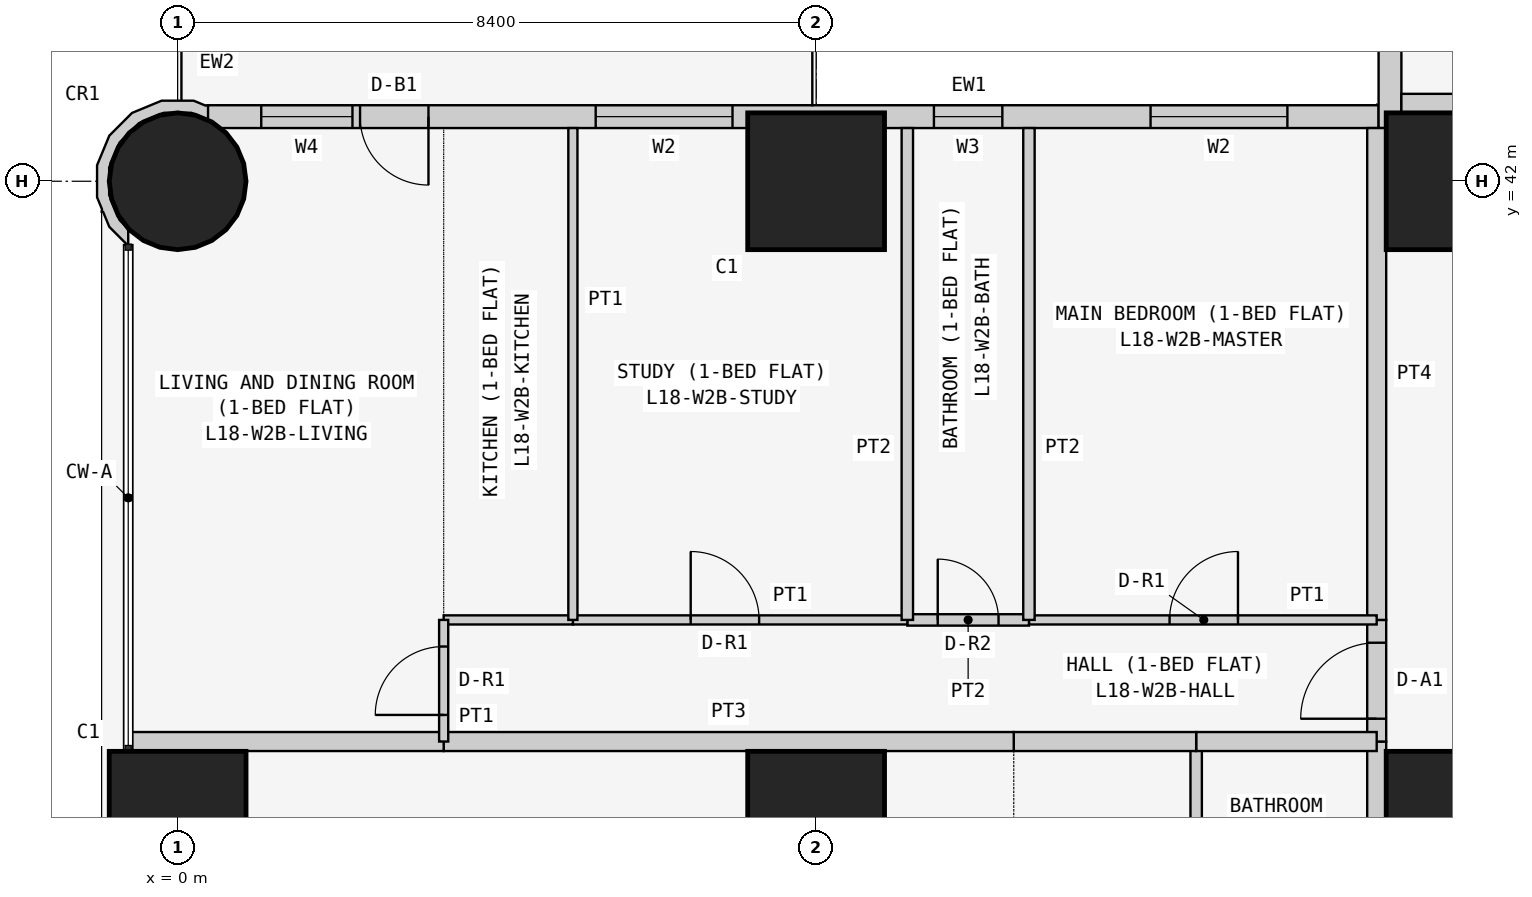
"""IFC4 building model, lengths in metres.
Left out: names, types, materials, properties, quantities, classifications, styles, units other than length and angle.
Written with IfcOpenShell. Run it as: python <this file> out.ifc"""

import sys

from ifc_helpers import new_model, si_unit, direction, frame, frame_2d, origin, origin_2d, place, context, subcontext, project, spatial, polyline, rectangle, circle, outline, extrude, element, fill, save


model = new_model("IFC4")
c1 = context("Model", 3, precision=1e-05, world=origin(), true_north=direction((0.0, 1.0)))
c2 = subcontext(c1, "Body", "Model", "MODEL_VIEW")
j1 = project(units=[si_unit("LENGTHUNIT", "METRE"), si_unit("PLANEANGLEUNIT", "RADIAN")], contexts=[c1])
p1 = place(None, origin())
s1 = spatial("IfcSite", under=j1, at=p1, CompositionType="ELEMENT")
p2 = place(p1, origin())
s2 = spatial("IfcBuilding", under=s1, at=p2, CompositionType="ELEMENT")
p3 = place(p2, frame((0.0, 0.0, 74.1)))
s3 = spatial("IfcBuildingStorey", under=s2, at=p3, CompositionType="ELEMENT", Elevation=74.1)
p4 = place(p3, frame((0.0, 33.6, 0.0), z_axis=(0.0, 0.0, 1.0), x_axis=(1.0, 0.0, 0.0)))
e1 = element("IfcColumn", 1, at=p4, inside=s3, PredefinedType="COLUMN", context=c2, shape_type="SweptSolid", body=[
    extrude(rectangle(XDim=1.8, YDim=1.8, at=origin_2d()), origin(), (0.0, 0.0, 1.0), 3.6),
])
p5 = place(p3, frame((0.0, 42.0, 0.0), z_axis=(0.0, 0.0, 1.0), x_axis=(1.0, 0.0, 0.0)))
e2 = element("IfcColumn", 2, at=p5, inside=s3, PredefinedType="COLUMN", context=c2, shape_type="SweptSolid", body=[
    extrude(circle(Radius=0.9, at=origin_2d()), origin(), (0.0, 0.0, 1.0), 3.6),
])
for number, where, z_axis, x_axis in (
    (3, (8.4, 33.6, 0.0), (0.0, 0.0, 1.0), (1.0, 0.0, 0.0)),
    (4, (8.4, 42.0, 0.0), (0.0, 0.0, 1.0), (1.0, 0.0, 0.0)),
    (5, (16.8, 33.6, 0.0), (0.0, 0.0, 1.0), (1.0, 0.0, 0.0)),
    (6, (16.8, 42.0, 0.0), (0.0, 0.0, 1.0), (1.0, 0.0, 0.0)),
):
    element("IfcColumn", number, at=place(p3, frame(where, z_axis=z_axis, x_axis=x_axis)), inside=s3, PredefinedType="COLUMN", context=c2, shape_type="SweptSolid", body=[
        extrude(rectangle(XDim=1.8, YDim=1.8, at=origin_2d()), origin(), (0.0, 0.0, 1.0), 3.6),
    ])
p6 = place(p3, frame((15.8, 42.85, 0.0), z_axis=(0.0, 0.0, 1.0), x_axis=(-1.0, 0.0, 0.0)))
e7 = element("IfcWall", 7, at=p6, inside=s3, PredefinedType="SOLIDWALL", context=c2, shape_type="SweptSolid", body=[
    extrude(rectangle(XDim=15.4, YDim=0.3, at=frame_2d((7.7, 0.0))), origin(), (0.0, 0.0, 1.0), 3.45),
])
p7 = place(p6, frame((1.2, 0.0, 0.9)))
e8 = element("IfcOpeningElement", 8, at=p7, cuts=e7, PredefinedType="OPENING", context=c2, shape_type="SweptSolid", body=[
    extrude(rectangle(XDim=1.8, YDim=1.5, at=frame_2d((0.9, 0.75))), frame((0.0, 0.16, 0.0), z_axis=(0.0, -1.0, 0.0), x_axis=(1.0, 0.0, 0.0)), (0.0, 0.0, 1.0), 0.32),
])
p8 = place(p6, frame((4.95, 0.0, 1.5)))
e9 = element("IfcOpeningElement", 9, at=p8, cuts=e7, PredefinedType="OPENING", context=c2, shape_type="SweptSolid", body=[
    extrude(rectangle(XDim=0.9, YDim=0.7, at=frame_2d((0.45, 0.35))), frame((0.0, 0.16, 0.0), z_axis=(0.0, -1.0, 0.0), x_axis=(1.0, 0.0, 0.0)), (0.0, 0.0, 1.0), 0.32),
])
p9 = place(p6, frame((8.5, 0.0, 0.9)))
e10 = element("IfcOpeningElement", 10, at=p9, cuts=e7, PredefinedType="OPENING", context=c2, shape_type="SweptSolid", body=[
    extrude(rectangle(XDim=1.8, YDim=1.5, at=frame_2d((0.9, 0.75))), frame((0.0, 0.16, 0.0), z_axis=(0.0, -1.0, 0.0), x_axis=(1.0, 0.0, 0.0)), (0.0, 0.0, 1.0), 0.32),
])
p10 = place(p6, frame((12.5, 0.0, 0.0)))
e11 = element("IfcOpeningElement", 11, at=p10, cuts=e7, PredefinedType="OPENING", context=c2, shape_type="SweptSolid", body=[
    extrude(rectangle(XDim=0.9, YDim=2.4, at=frame_2d((0.45, 1.2))), frame((0.0, 0.16, 0.0), z_axis=(0.0, -1.0, 0.0), x_axis=(1.0, 0.0, 0.0)), (0.0, 0.0, 1.0), 0.32),
])
p11 = place(p6, frame((13.5, 0.0, 0.9)))
e12 = element("IfcOpeningElement", 12, at=p11, cuts=e7, PredefinedType="OPENING", context=c2, shape_type="SweptSolid", body=[
    extrude(rectangle(XDim=1.2, YDim=1.5, at=frame_2d((0.6, 0.75))), frame((0.0, 0.16, 0.0), z_axis=(0.0, -1.0, 0.0), x_axis=(1.0, 0.0, 0.0)), (0.0, 0.0, 1.0), 0.32),
])
p12 = place(p3, frame((15.95, 58.4, 0.0), z_axis=(0.0, 0.0, 1.0), x_axis=(0.0, -1.0, 0.0)))
e13 = element("IfcWall", 13, at=p12, inside=s3, PredefinedType="SOLIDWALL", context=c2, shape_type="SweptSolid", body=[
    extrude(rectangle(XDim=15.7, YDim=0.3, at=frame_2d((7.85, 0.0))), origin(), (0.0, 0.0, 1.0), 3.45),
])
p13 = place(p12, frame((12.4, 0.0, 0.9)))
e14 = element("IfcOpeningElement", 14, at=p13, cuts=e13, PredefinedType="OPENING", context=c2, shape_type="SweptSolid", body=[
    extrude(rectangle(XDim=1.8, YDim=1.5, at=frame_2d((0.9, 0.75))), frame((0.0, 0.16, 0.0), z_axis=(0.0, -1.0, 0.0), x_axis=(1.0, 0.0, 0.0)), (0.0, 0.0, 1.0), 0.32),
])
p14 = place(p12, frame((9.55, 0.0, 1.5)))
e15 = element("IfcOpeningElement", 15, at=p14, cuts=e13, PredefinedType="OPENING", context=c2, shape_type="SweptSolid", body=[
    extrude(rectangle(XDim=0.9, YDim=0.7, at=frame_2d((0.45, 0.35))), frame((0.0, 0.16, 0.0), z_axis=(0.0, -1.0, 0.0), x_axis=(1.0, 0.0, 0.0)), (0.0, 0.0, 1.0), 0.32),
])
p15 = place(p12, frame((5.1, 0.0, 0.9)))
e16 = element("IfcOpeningElement", 16, at=p15, cuts=e13, PredefinedType="OPENING", context=c2, shape_type="SweptSolid", body=[
    extrude(rectangle(XDim=1.8, YDim=1.5, at=frame_2d((0.9, 0.75))), frame((0.0, 0.16, 0.0), z_axis=(0.0, -1.0, 0.0), x_axis=(1.0, 0.0, 0.0)), (0.0, 0.0, 1.0), 0.32),
])
p16 = place(p12, frame((2.0, 0.0, 0.0)))
e17 = element("IfcOpeningElement", 17, at=p16, cuts=e13, PredefinedType="OPENING", context=c2, shape_type="SweptSolid", body=[
    extrude(rectangle(XDim=0.9, YDim=2.4, at=frame_2d((0.45, 1.2))), frame((0.0, 0.16, 0.0), z_axis=(0.0, -1.0, 0.0), x_axis=(1.0, 0.0, 0.0)), (0.0, 0.0, 1.0), 0.32),
])
p17 = place(p12, frame((0.7, 0.0, 0.9)))
e18 = element("IfcOpeningElement", 18, at=p17, cuts=e13, PredefinedType="OPENING", context=c2, shape_type="SweptSolid", body=[
    extrude(rectangle(XDim=1.2, YDim=1.5, at=frame_2d((0.6, 0.75))), frame((0.0, 0.16, 0.0), z_axis=(0.0, -1.0, 0.0), x_axis=(1.0, 0.0, 0.0)), (0.0, 0.0, 1.0), 0.32),
])
p18 = place(p3, frame((0.364, 42.91, 0.0), z_axis=(0.0, 0.0, 1.0), x_axis=(-0.926129809145, 0.377204953059, 0.0)))
e19 = element("IfcWall", 19, at=p18, inside=s3, PredefinedType="SOLIDWALL", context=c2, shape_type="SweptSolid", body=[
    extrude(outline(polyline([(0.36, 1.803), (0.509, 1.741), (0.761, 1.486), (0.896, 1.154), (0.894, 0.795), (0.755, 0.465), (0.5, 0.213), (0.168, 0.078), (-0.1, 0.08), (0.001, -0.097), (0.03, -0.08), (0.199, -0.081), (0.589, 0.078), (0.889, 0.374), (1.053, 0.763), (1.055, 1.185), (0.896, 1.575), (0.778, 1.695), (0.769, 1.728), (0.75, 1.723), (0.6, 1.875), (0.295, 2.003), (0.281, 1.998), (0.36, 1.803)])), origin(), (0.0, 0.0, 1.0), 3.45),
])
p19 = place(p3, frame((16.1, 43.025, 0.0), z_axis=(0.0, 0.0, 1.0), x_axis=(1.0, 0.0, 0.0)))
e20 = element("IfcWall", 20, at=p19, inside=s3, PredefinedType="PARTITIONING", context=c2, shape_type="SweptSolid", body=[
    extrude(rectangle(XDim=6.871, YDim=0.25, at=frame_2d((3.436, 0.0))), origin(), (0.0, 0.0, 1.0), 3.45),
])
p20 = place(p3, frame((15.775, 32.0, 0.0), z_axis=(0.0, 0.0, 1.0), x_axis=(0.0, 1.0, 0.0)))
e21 = element("IfcWall", 21, at=p20, inside=s3, PredefinedType="PARTITIONING", context=c2, shape_type="SweptSolid", body=[
    extrude(rectangle(XDim=2.629, YDim=0.25, at=frame_2d((1.314, 0.0))), origin(), (0.0, 0.0, 1.0), 3.45),
])
p21 = place(p3, frame((15.775, 34.629, 0.0), z_axis=(0.0, 0.0, 1.0), x_axis=(0.0, 1.0, 0.0)))
e22 = element("IfcWall", 22, at=p21, inside=s3, PredefinedType="PARTITIONING", context=c2, shape_type="SweptSolid", body=[
    extrude(rectangle(XDim=1.6, YDim=0.25, at=frame_2d((0.8, 0.0))), origin(), (0.0, 0.0, 1.0), 3.45),
])
p22 = place(p21, frame((0.3, 0.0, 0.0)))
e23 = element("IfcOpeningElement", 23, at=p22, cuts=e22, PredefinedType="OPENING", context=c2, shape_type="SweptSolid", body=[
    extrude(rectangle(XDim=1.0, YDim=2.1, at=frame_2d((0.5, 1.05))), frame((0.0, 0.135, 0.0), z_axis=(0.0, -1.0, 0.0), x_axis=(1.0, 0.0, 0.0)), (0.0, 0.0, 1.0), 0.27),
])
p23 = place(p3, frame((15.775, 36.229, 0.0), z_axis=(0.0, 0.0, 1.0), x_axis=(0.0, 1.0, 0.0)))
e24 = element("IfcWall", 24, at=p23, inside=s3, PredefinedType="PARTITIONING", context=c2, shape_type="SweptSolid", body=[
    extrude(rectangle(XDim=6.471, YDim=0.25, at=frame_2d((3.235, 0.0))), origin(), (0.0, 0.0, 1.0), 3.45),
])
p24 = place(p3, frame((13.4, 32.0, 0.0), z_axis=(0.0, 0.0, 1.0), x_axis=(0.0, 1.0, 0.0)))
e25 = element("IfcWall", 25, at=p24, inside=s3, PredefinedType="PARTITIONING", context=c2, shape_type="SweptSolid", body=[
    extrude(rectangle(XDim=2.629, YDim=0.15, at=frame_2d((1.314, 0.0))), origin(), (0.0, 0.0, 1.0), 3.45),
])
p25 = place(p3, frame((13.4, 34.629, 0.0), z_axis=(0.0, 0.0, 1.0), x_axis=(1.0, 0.0, 0.0)))
e26 = element("IfcWall", 26, at=p25, inside=s3, PredefinedType="PARTITIONING", context=c2, shape_type="SweptSolid", body=[
    extrude(rectangle(XDim=2.375, YDim=0.25, at=frame_2d((1.188, 0.0))), origin(), (0.0, 0.0, 1.0), 3.45),
])
p26 = place(p3, frame((11.0, 34.629, 0.0), z_axis=(0.0, 0.0, 1.0), x_axis=(1.0, 0.0, 0.0)))
e27 = element("IfcWall", 27, at=p26, inside=s3, PredefinedType="PARTITIONING", context=c2, shape_type="SweptSolid", body=[
    extrude(rectangle(XDim=2.4, YDim=0.25, at=frame_2d((1.2, 0.0))), origin(), (0.0, 0.0, 1.0), 3.45),
])
p27 = place(p3, frame((3.5, 34.629, 0.0), z_axis=(0.0, 0.0, 1.0), x_axis=(1.0, 0.0, 0.0)))
e28 = element("IfcWall", 28, at=p27, inside=s3, PredefinedType="PARTITIONING", context=c2, shape_type="SweptSolid", body=[
    extrude(rectangle(XDim=7.5, YDim=0.25, at=frame_2d((3.75, 0.0))), origin(), (0.0, 0.0, 1.0), 3.45),
])
p28 = place(p3, frame((-0.65, 34.629, 0.0), z_axis=(0.0, 0.0, 1.0), x_axis=(1.0, 0.0, 0.0)))
e29 = element("IfcWall", 29, at=p28, inside=s3, PredefinedType="PARTITIONING", context=c2, shape_type="SweptSolid", body=[
    extrude(rectangle(XDim=4.15, YDim=0.25, at=frame_2d((2.075, 0.0))), origin(), (0.0, 0.0, 1.0), 3.45),
])
p29 = place(p3, frame((11.2, 36.229, 0.0), z_axis=(0.0, 0.0, 1.0), x_axis=(1.0, 0.0, 0.0)))
e30 = element("IfcWall", 30, at=p29, inside=s3, PredefinedType="PARTITIONING", context=c2, shape_type="SweptSolid", body=[
    extrude(rectangle(XDim=4.575, YDim=0.12, at=frame_2d((2.288, 0.0))), origin(), (0.0, 0.0, 1.0), 3.45),
])
p30 = place(p29, frame((1.85, 0.0, 0.0)))
e31 = element("IfcOpeningElement", 31, at=p30, cuts=e30, PredefinedType="OPENING", context=c2, shape_type="SweptSolid", body=[
    extrude(rectangle(XDim=0.9, YDim=2.1, at=frame_2d((0.45, 1.05))), frame((0.0, 0.07, 0.0), z_axis=(0.0, -1.0, 0.0), x_axis=(1.0, 0.0, 0.0)), (0.0, 0.0, 1.0), 0.14),
])
p31 = place(p3, frame((9.6, 36.229, 0.0), z_axis=(0.0, 0.0, 1.0), x_axis=(1.0, 0.0, 0.0)))
e32 = element("IfcWall", 32, at=p31, inside=s3, PredefinedType="PARTITIONING", context=c2, shape_type="SweptSolid", body=[
    extrude(rectangle(XDim=1.6, YDim=0.15, at=frame_2d((0.8, 0.0))), origin(), (0.0, 0.0, 1.0), 3.45),
])
p32 = place(p31, frame((0.4, 0.0, 0.0)))
e33 = element("IfcOpeningElement", 33, at=p32, cuts=e32, PredefinedType="OPENING", context=c2, shape_type="SweptSolid", body=[
    extrude(rectangle(XDim=0.8, YDim=2.1, at=frame_2d((0.4, 1.05))), frame((0.0, 0.085, 0.0), z_axis=(0.0, -1.0, 0.0), x_axis=(1.0, 0.0, 0.0)), (0.0, 0.0, 1.0), 0.17),
])
p33 = place(p3, frame((5.2, 36.229, 0.0), z_axis=(0.0, 0.0, 1.0), x_axis=(1.0, 0.0, 0.0)))
e34 = element("IfcWall", 34, at=p33, inside=s3, PredefinedType="PARTITIONING", context=c2, shape_type="SweptSolid", body=[
    extrude(rectangle(XDim=4.4, YDim=0.12, at=frame_2d((2.2, 0.0))), origin(), (0.0, 0.0, 1.0), 3.45),
])
p34 = place(p33, frame((1.55, 0.0, 0.0)))
e35 = element("IfcOpeningElement", 35, at=p34, cuts=e34, PredefinedType="OPENING", context=c2, shape_type="SweptSolid", body=[
    extrude(rectangle(XDim=0.9, YDim=2.1, at=frame_2d((0.45, 1.05))), frame((0.0, 0.07, 0.0), z_axis=(0.0, -1.0, 0.0), x_axis=(1.0, 0.0, 0.0)), (0.0, 0.0, 1.0), 0.14),
])
p35 = place(p3, frame((3.5, 36.229, 0.0), z_axis=(0.0, 0.0, 1.0), x_axis=(1.0, 0.0, 0.0)))
e36 = element("IfcWall", 36, at=p35, inside=s3, PredefinedType="PARTITIONING", context=c2, shape_type="SweptSolid", body=[
    extrude(rectangle(XDim=1.7, YDim=0.12, at=frame_2d((0.85, 0.0))), origin(), (0.0, 0.0, 1.0), 3.45),
])
p36 = place(p3, frame((3.5, 34.629, 0.0), z_axis=(0.0, 0.0, 1.0), x_axis=(0.0, 1.0, 0.0)))
e37 = element("IfcWall", 37, at=p36, inside=s3, PredefinedType="PARTITIONING", context=c2, shape_type="SweptSolid", body=[
    extrude(rectangle(XDim=1.6, YDim=0.12, at=frame_2d((0.8, 0.0))), origin(), (0.0, 0.0, 1.0), 3.45),
])
p37 = place(p36, frame((0.35, 0.0, 0.0)))
e38 = element("IfcOpeningElement", 38, at=p37, cuts=e37, PredefinedType="OPENING", context=c2, shape_type="SweptSolid", body=[
    extrude(rectangle(XDim=0.9, YDim=2.1, at=frame_2d((0.45, 1.05))), frame((0.0, 0.07, 0.0), z_axis=(0.0, -1.0, 0.0), x_axis=(1.0, 0.0, 0.0)), (0.0, 0.0, 1.0), 0.14),
])
for number, where, z_axis, x_axis in (
    (39, (11.2, 36.229, 0.0), (0.0, 0.0, 1.0), (0.0, 1.0, 0.0)),
    (40, (9.6, 36.229, 0.0), (0.0, 0.0, 1.0), (0.0, 1.0, 0.0)),
):
    element("IfcWall", number, at=place(p3, frame(where, z_axis=z_axis, x_axis=x_axis)), inside=s3, PredefinedType="PARTITIONING", context=c2, shape_type="SweptSolid", body=[
        extrude(rectangle(XDim=6.471, YDim=0.15, at=frame_2d((3.235, 0.0))), origin(), (0.0, 0.0, 1.0), 3.45),
    ])
p38 = place(p3, frame((5.2, 36.229, 0.0), z_axis=(0.0, 0.0, 1.0), x_axis=(0.0, 1.0, 0.0)))
e41 = element("IfcWall", 41, at=p38, inside=s3, PredefinedType="PARTITIONING", context=c2, shape_type="SweptSolid", body=[
    extrude(rectangle(XDim=6.471, YDim=0.12, at=frame_2d((3.235, 0.0))), origin(), (0.0, 0.0, 1.0), 3.45),
])
p39 = place(p7, origin())
e42 = element("IfcWindow", 42, at=p39, inside=s3, PartitioningType="SINGLE_PANEL", PredefinedType="WINDOW", context=c2, shape_type="SweptSolid", body=[
    extrude(rectangle(XDim=1.8, YDim=1.5, at=frame_2d((0.9, 0.75))), frame((0.0, 0.03, 0.0), z_axis=(0.0, -1.0, 0.0), x_axis=(1.0, 0.0, 0.0)), (0.0, 0.0, 1.0), 0.06),
])
fill(e8, e42)
p40 = place(p8, origin())
e43 = element("IfcWindow", 43, at=p40, inside=s3, PartitioningType="SINGLE_PANEL", PredefinedType="WINDOW", context=c2, shape_type="SweptSolid", body=[
    extrude(rectangle(XDim=0.9, YDim=0.7, at=frame_2d((0.45, 0.35))), frame((0.0, 0.03, 0.0), z_axis=(0.0, -1.0, 0.0), x_axis=(1.0, 0.0, 0.0)), (0.0, 0.0, 1.0), 0.06),
])
fill(e9, e43)
p41 = place(p9, origin())
e44 = element("IfcWindow", 44, at=p41, inside=s3, PartitioningType="SINGLE_PANEL", PredefinedType="WINDOW", context=c2, shape_type="SweptSolid", body=[
    extrude(rectangle(XDim=1.8, YDim=1.5, at=frame_2d((0.9, 0.75))), frame((0.0, 0.03, 0.0), z_axis=(0.0, -1.0, 0.0), x_axis=(1.0, 0.0, 0.0)), (0.0, 0.0, 1.0), 0.06),
])
fill(e10, e44)
p42 = place(p10, origin())
e45 = element("IfcDoor", 45, at=p42, inside=s3, OperationType="SINGLE_SWING_LEFT", PredefinedType="DOOR", context=c2, shape_type="SweptSolid", body=[
    extrude(rectangle(XDim=0.9, YDim=2.4, at=frame_2d((0.45, 1.2))), frame((0.0, 0.025, 0.0), z_axis=(0.0, -1.0, 0.0), x_axis=(1.0, 0.0, 0.0)), (0.0, 0.0, 1.0), 0.05),
])
fill(e11, e45)
p43 = place(p11, origin())
e46 = element("IfcWindow", 46, at=p43, inside=s3, PartitioningType="SINGLE_PANEL", PredefinedType="WINDOW", context=c2, shape_type="SweptSolid", body=[
    extrude(rectangle(XDim=1.2, YDim=1.5, at=frame_2d((0.6, 0.75))), frame((0.0, 0.03, 0.0), z_axis=(0.0, -1.0, 0.0), x_axis=(1.0, 0.0, 0.0)), (0.0, 0.0, 1.0), 0.06),
])
fill(e12, e46)
p44 = place(p22, origin())
e47 = element("IfcDoor", 47, at=p44, inside=s3, OperationType="SINGLE_SWING_LEFT", PredefinedType="DOOR", context=c2, shape_type="SweptSolid", body=[
    extrude(rectangle(XDim=1.0, YDim=2.1, at=frame_2d((0.5, 1.05))), frame((0.0, 0.025, 0.0), z_axis=(0.0, -1.0, 0.0), x_axis=(1.0, 0.0, 0.0)), (0.0, 0.0, 1.0), 0.05),
])
fill(e23, e47)
p45 = place(p30, origin())
e48 = element("IfcDoor", 48, at=p45, inside=s3, OperationType="SINGLE_SWING_RIGHT", PredefinedType="DOOR", context=c2, shape_type="SweptSolid", body=[
    extrude(rectangle(XDim=0.9, YDim=2.1, at=frame_2d((0.45, 1.05))), frame((0.0, 0.025, 0.0), z_axis=(0.0, -1.0, 0.0), x_axis=(1.0, 0.0, 0.0)), (0.0, 0.0, 1.0), 0.05),
])
fill(e31, e48)
p46 = place(p32, origin())
e49 = element("IfcDoor", 49, at=p46, inside=s3, OperationType="SINGLE_SWING_LEFT", PredefinedType="DOOR", context=c2, shape_type="SweptSolid", body=[
    extrude(rectangle(XDim=0.8, YDim=2.1, at=frame_2d((0.4, 1.05))), frame((0.0, 0.025, 0.0), z_axis=(0.0, -1.0, 0.0), x_axis=(1.0, 0.0, 0.0)), (0.0, 0.0, 1.0), 0.05),
])
fill(e33, e49)
p47 = place(p34, origin())
e50 = element("IfcDoor", 50, at=p47, inside=s3, OperationType="SINGLE_SWING_LEFT", PredefinedType="DOOR", context=c2, shape_type="SweptSolid", body=[
    extrude(rectangle(XDim=0.9, YDim=2.1, at=frame_2d((0.45, 1.05))), frame((0.0, 0.025, 0.0), z_axis=(0.0, -1.0, 0.0), x_axis=(1.0, 0.0, 0.0)), (0.0, 0.0, 1.0), 0.05),
])
fill(e35, e50)
p48 = place(p37, origin())
e51 = element("IfcDoor", 51, at=p48, inside=s3, OperationType="SINGLE_SWING_LEFT", PredefinedType="DOOR", context=c2, shape_type="SweptSolid", body=[
    extrude(rectangle(XDim=0.9, YDim=2.1, at=frame_2d((0.45, 1.05))), frame((0.0, 0.025, 0.0), z_axis=(0.0, -1.0, 0.0), x_axis=(1.0, 0.0, 0.0)), (0.0, 0.0, 1.0), 0.05),
])
fill(e38, e51)
save(model, sys.argv[1])
